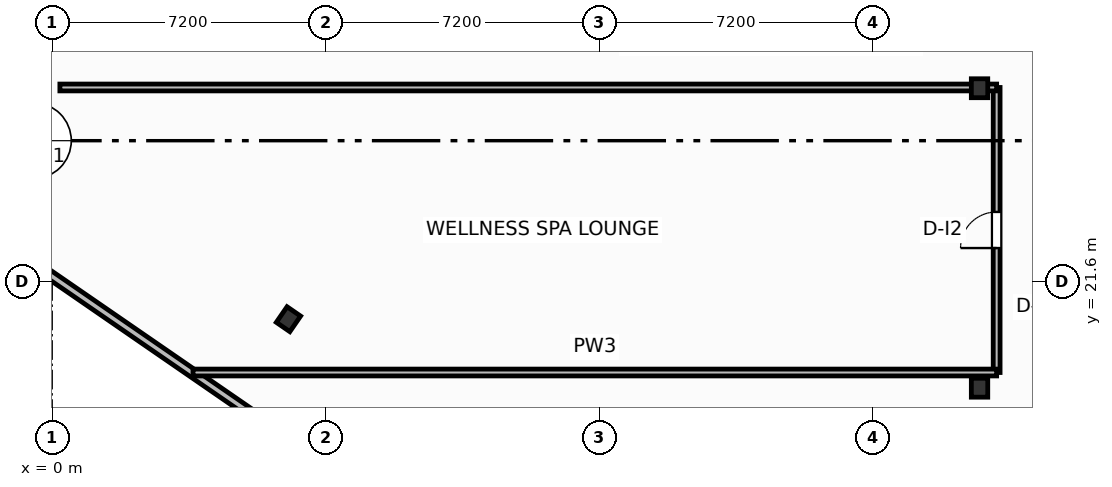
"""IFC4 building model, lengths in metres.
Left out: names, types, materials, properties, quantities, classifications, styles, units other than length and angle.
Written with IfcOpenShell. Run it as: python <this file> out.ifc"""

import sys

from ifc_helpers import new_model, si_unit, direction, frame, frame_2d, origin, origin_2d, place, context, subcontext, project, spatial, rectangle, i_section, extrude, element, fill, save


model = new_model("IFC4")
c1 = context("Model", 3, precision=1e-05, world=origin(), true_north=direction((0.0, 1.0)))
c2 = subcontext(c1, "Body", "Model", "MODEL_VIEW")
j1 = project(units=[si_unit("LENGTHUNIT", "METRE"), si_unit("PLANEANGLEUNIT", "RADIAN")], contexts=[c1])
p1 = place(None, origin())
s1 = spatial("IfcSite", under=j1, at=p1, CompositionType="ELEMENT")
p2 = place(p1, origin())
s2 = spatial("IfcBuilding", under=s1, at=p2, CompositionType="ELEMENT")
p3 = place(p2, frame((0.0, 0.0, 30.7)))
s3 = spatial("IfcBuildingStorey", under=s2, at=p3, CompositionType="ELEMENT", Elevation=30.7)
for number, where, z_axis, x_axis in (
    (1, (24.4, 18.8, 0.0), (0.0, 0.0, 1.0), (1.0, 0.0, 0.0)),
    (2, (24.4, 26.68, 0.0), (0.0, 0.0, 1.0), (1.0, 0.0, 0.0)),
    (3, (6.215, 20.603, 0.0), (0.0, 0.0, 1.0), (0.824, -0.567, 0.0)),
):
    element("IfcColumn", number, at=place(p3, frame(where, z_axis=z_axis, x_axis=x_axis)), inside=s3, PredefinedType="COLUMN", context=c2, shape_type="SweptSolid", body=[
        extrude(i_section(OverallWidth=0.432, OverallDepth=0.498, WebThickness=0.056, FlangeThickness=0.089, FilletRadius=0.025, at=origin_2d()), origin(), (0.0, 0.0, 1.0), 3.7),
    ])
p4 = place(p3, frame((-2.728, 23.605, 0.0), z_axis=(0.0, 0.0, 1.0), x_axis=(0.823535075462, -0.567265351915, 0.0)))
e4 = element("IfcWall", 4, at=p4, inside=s3, PredefinedType="SOLIDWALL", context=c2, shape_type="SweptSolid", body=[
    extrude(rectangle(XDim=23.247, YDim=0.22, at=frame_2d((11.624, 0.0))), origin(), (0.0, 0.0, 1.0), 2.73),
])
p5 = place(p4, frame((10.799, 0.0, 0.8)))
e5 = element("IfcOpeningElement", 5, at=p5, cuts=e4, PredefinedType="OPENING", context=c2, shape_type="SweptSolid", body=[
    extrude(rectangle(XDim=1.65, YDim=1.65, at=frame_2d((0.825, 0.825))), frame((0.0, 0.12, 0.0), z_axis=(0.0, -1.0, 0.0), x_axis=(1.0, 0.0, 0.0)), (0.0, 0.0, 1.0), 0.24),
])
p6 = place(p3, frame((24.85, 19.2, 0.0), z_axis=(0.0, 0.0, 1.0), x_axis=(0.0, 1.0, 0.0)))
e6 = element("IfcWall", 6, at=p6, inside=s3, PredefinedType="PARTITIONING", context=c2, shape_type="SweptSolid", body=[
    extrude(rectangle(XDim=7.5, YDim=0.18, at=frame_2d((3.75, 0.0))), origin(), (0.0, 0.0, 1.0), 3.45),
])
p7 = place(p6, frame((3.275, 0.0, 0.0)))
e7 = element("IfcOpeningElement", 7, at=p7, cuts=e6, PredefinedType="OPENING", context=c2, shape_type="SweptSolid", body=[
    extrude(rectangle(XDim=0.95, YDim=2.05, at=frame_2d((0.475, 1.025))), frame((0.0, 0.1, 0.0), z_axis=(0.0, -1.0, 0.0), x_axis=(1.0, 0.0, 0.0)), (0.0, 0.0, 1.0), 0.2),
])
p8 = place(p3, frame((3.703, 19.2, 0.0), z_axis=(0.0, 0.0, 1.0), x_axis=(1.0, 0.0, 0.0)))
e8 = element("IfcWall", 8, at=p8, inside=s3, PredefinedType="PARTITIONING", context=c2, shape_type="SweptSolid", body=[
    extrude(rectangle(XDim=21.147, YDim=0.18, at=frame_2d((10.574, 0.0))), origin(), (0.0, 0.0, 1.0), 2.58),
])
p9 = place(p3, frame((0.2, 26.7, 0.0), z_axis=(0.0, 0.0, 1.0), x_axis=(1.0, 0.0, 0.0)))
e9 = element("IfcWall", 9, at=p9, inside=s3, PredefinedType="PARTITIONING", context=c2, shape_type="SweptSolid", body=[
    extrude(rectangle(XDim=24.65, YDim=0.18, at=frame_2d((12.325, 0.0))), origin(), (0.0, 0.0, 1.0), 2.662),
])
p10 = place(p7, origin())
e10 = element("IfcDoor", 10, at=p10, inside=s3, OperationType="SINGLE_SWING_LEFT", PredefinedType="DOOR", context=c2, shape_type="SweptSolid", body=[
    extrude(rectangle(XDim=0.95, YDim=2.05, at=frame_2d((0.475, 1.025))), frame((0.0, 0.025, 0.0), z_axis=(0.0, -1.0, 0.0), x_axis=(1.0, 0.0, 0.0)), (0.0, 0.0, 1.0), 0.05),
])
fill(e7, e10)
save(model, sys.argv[1])
